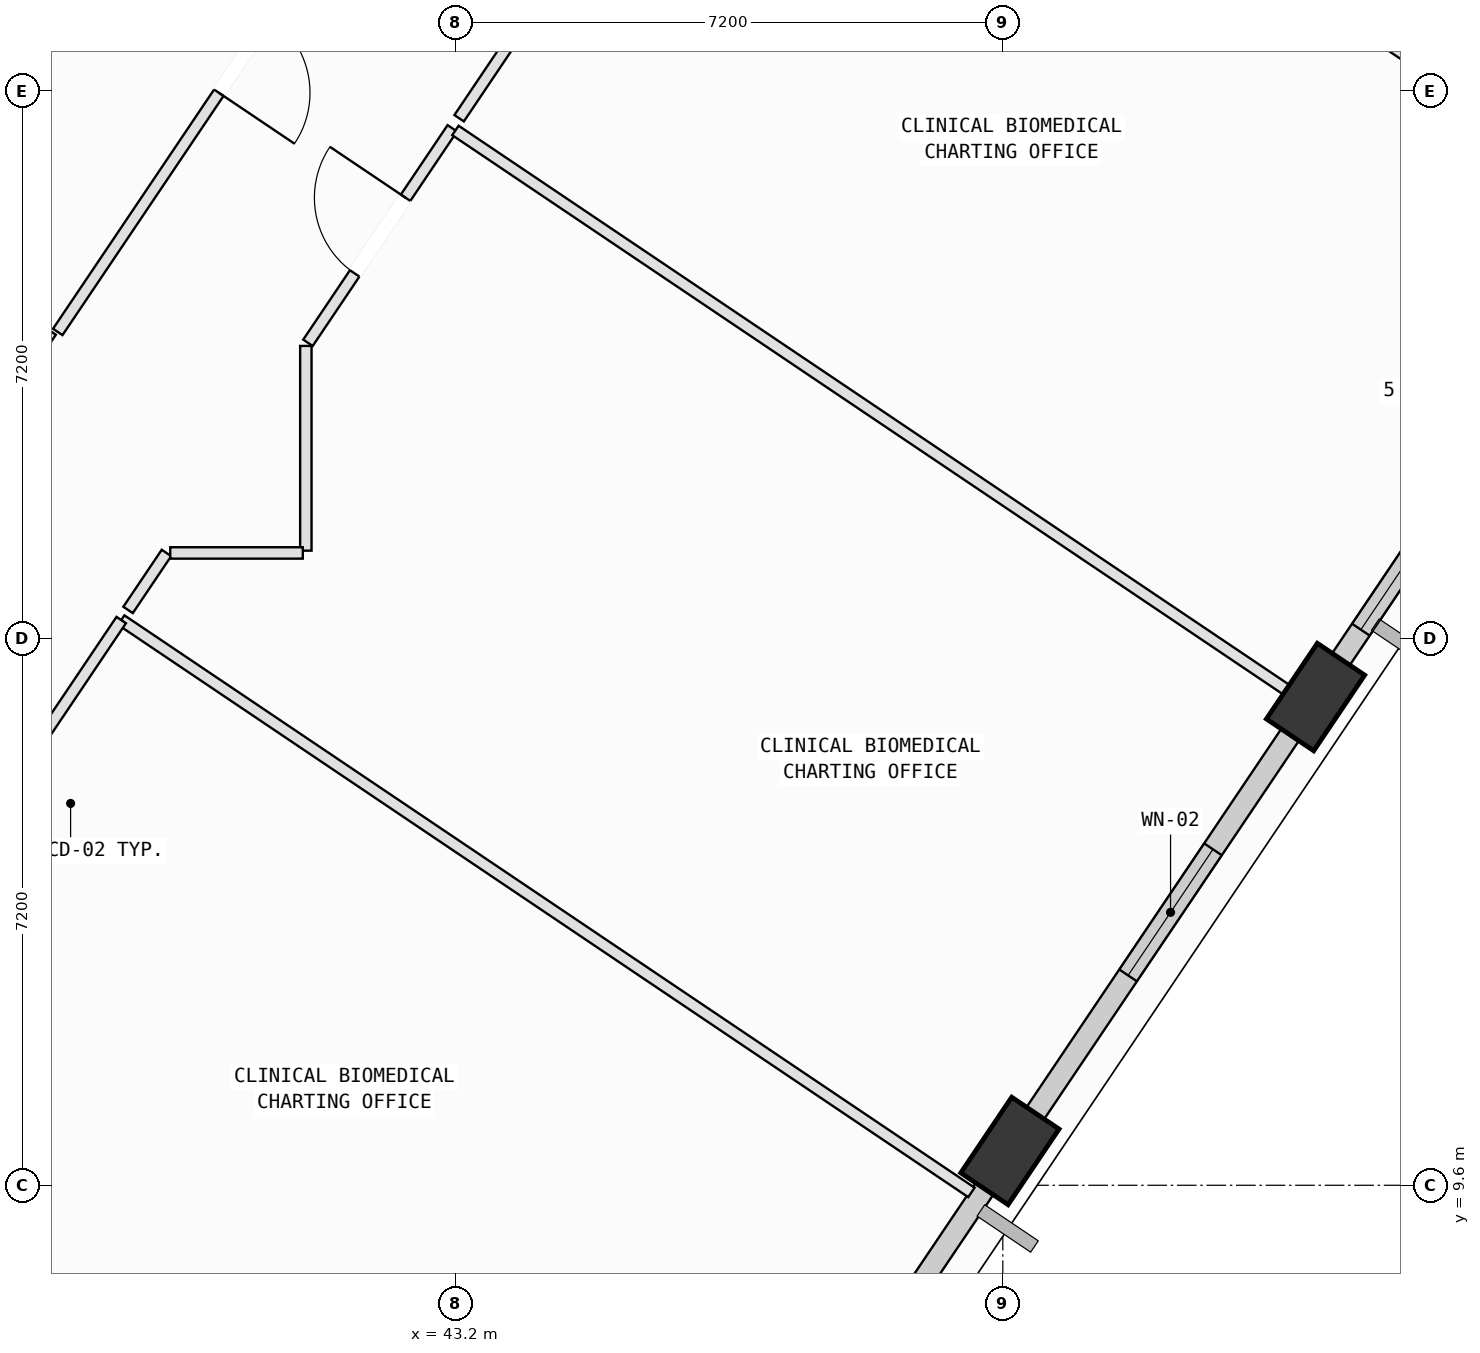
"""IFC4 building model, lengths in metres.
Left out: names, types, materials, properties, quantities, classifications, styles, units other than length and angle.
Written with IfcOpenShell. Run it as: python <this file> out.ifc"""

import sys

from ifc_helpers import new_model, si_unit, direction, frame, frame_2d, origin, origin_2d, place, context, subcontext, project, spatial, rectangle, extrude, element, fill, save


model = new_model("IFC4")
c1 = context("Model", 3, precision=1e-05, world=origin(), true_north=direction((0.0, 1.0)))
c2 = subcontext(c1, "Body", "Model", "MODEL_VIEW")
j1 = project(units=[si_unit("LENGTHUNIT", "METRE"), si_unit("PLANEANGLEUNIT", "RADIAN")], contexts=[c1])
p1 = place(None, origin())
s1 = spatial("IfcSite", under=j1, at=p1, CompositionType="ELEMENT")
p2 = place(p1, origin())
s2 = spatial("IfcBuilding", under=s1, at=p2, CompositionType="ELEMENT")
p3 = place(p2, frame((0.0, 0.0, 263.2)))
s3 = spatial("IfcBuildingStorey", under=s2, at=p3, CompositionType="ELEMENT", Elevation=263.2)
p4 = place(p3, frame((50.493, 10.052, 0.002), z_axis=(0.060244957035, 0.070203312356, 0.995711825824), x_axis=(-0.961707168272, -0.263116868438, 0.076738751868)))
e1 = element("IfcColumn", 1, at=p4, inside=s3, PredefinedType="COLUMN", context=c2, shape_type="SweptSolid", body=[
    extrude(rectangle(XDim=1.2, YDim=0.75, at=origin_2d()), origin(), (0.0, 0.0, 1.0), 3.947),
])
p5 = place(p3, frame((54.514, 16.024, 0.002), z_axis=(0.035506690498, 0.086601684142, 0.9956100759), x_axis=(-0.830026397093, -0.552293328745, 0.077641864689)))
e2 = element("IfcColumn", 2, at=p5, inside=s3, PredefinedType="COLUMN", context=c2, shape_type="SweptSolid", body=[
    extrude(rectangle(XDim=1.2, YDim=0.75, at=origin_2d()), origin(), (0.0, 0.0, 1.0), 3.947),
])
p6 = place(p3, frame((50.375, 9.875, 0.0), z_axis=(0.0, 0.0, 1.0), x_axis=(-0.558480653556, -0.829517546291, 0.0)))
e3 = element("IfcWall", 3, at=p6, inside=s3, PredefinedType="SOLIDWALL", context=c2, shape_type="SweptSolid", body=[
    extrude(rectangle(XDim=6.413, YDim=0.28, at=frame_2d((3.207, 0.0))), origin(), (0.0, 0.0, 1.0), 3.185),
])
p7 = place(p6, frame((2.771, 0.0, 0.75)))
e4 = element("IfcOpeningElement", 4, at=p7, cuts=e3, PredefinedType="OPENING", context=c2, shape_type="SweptSolid", body=[
    extrude(rectangle(XDim=1.6, YDim=1.95, at=frame_2d((0.8, 0.975))), frame((0.0, 0.15, 0.0), z_axis=(0.0, -1.0, 0.0), x_axis=(1.0, 0.0, 0.0)), (0.0, 0.0, 1.0), 0.3),
])
p8 = place(p3, frame((54.396, 15.848, 0.0), z_axis=(0.0, 0.0, 1.0), x_axis=(-0.558449495044, -0.829538523208, 0.0)))
e5 = element("IfcWall", 5, at=p8, inside=s3, PredefinedType="SOLIDWALL", context=c2, shape_type="SweptSolid", body=[
    extrude(rectangle(XDim=6.407, YDim=0.28, at=frame_2d((3.203, 0.0))), origin(), (0.0, 0.0, 1.0), 3.185),
])
p9 = place(p8, frame((2.204, 0.0, 0.75)))
e6 = element("IfcOpeningElement", 6, at=p9, cuts=e5, PredefinedType="OPENING", context=c2, shape_type="SweptSolid", body=[
    extrude(rectangle(XDim=2.0, YDim=1.95, at=frame_2d((1.0, 0.975))), frame((0.0, 0.15, 0.0), z_axis=(0.0, -1.0, 0.0), x_axis=(1.0, 0.0, 0.0)), (0.0, 0.0, 1.0), 0.3),
])
p10 = place(p3, frame((58.423, 21.829, 0.0), z_axis=(0.0, 0.0, 1.0), x_axis=(-0.558495168745, -0.829507773615, 0.0)))
e7 = element("IfcWall", 7, at=p10, inside=s3, PredefinedType="SOLIDWALL", context=c2, shape_type="SweptSolid", body=[
    extrude(rectangle(XDim=6.418, YDim=0.28, at=frame_2d((3.209, 0.0))), origin(), (0.0, 0.0, 1.0), 3.185),
])
p11 = place(p10, frame((2.512, 0.0, 0.75)))
e8 = element("IfcOpeningElement", 8, at=p11, cuts=e7, PredefinedType="OPENING", context=c2, shape_type="SweptSolid", body=[
    extrude(rectangle(XDim=1.4, YDim=1.85, at=frame_2d((0.7, 0.925))), frame((0.0, 0.15, 0.0), z_axis=(0.0, -1.0, 0.0), x_axis=(1.0, 0.0, 0.0)), (0.0, 0.0, 1.0), 0.3),
])
p12 = place(p10, frame((4.53, 0.0, 0.75)))
e9 = element("IfcOpeningElement", 9, at=p12, cuts=e7, PredefinedType="OPENING", context=c2, shape_type="SweptSolid", body=[
    extrude(rectangle(XDim=1.4, YDim=1.85, at=frame_2d((0.7, 0.925))), frame((0.0, 0.15, 0.0), z_axis=(0.0, -1.0, 0.0), x_axis=(1.0, 0.0, 0.0)), (0.0, 0.0, 1.0), 0.3),
])
p13 = place(p3, frame((36.15, 9.419, 0.0), z_axis=(0.0, 0.0, 1.0), x_axis=(0.829512010083, -0.558488876458, 0.0)))
e10 = element("IfcWall", 10, at=p13, inside=s3, PredefinedType="PARTITIONING", context=c2, shape_type="SweptSolid", body=[
    extrude(rectangle(XDim=11.774, YDim=0.15, at=frame_2d((5.887, 0.0))), origin(), (0.0, 0.0, 1.0), 3.085),
])
p14 = place(p13, frame((5.457, 0.0, 0.0)))
e11 = element("IfcOpeningElement", 11, at=p14, cuts=e10, PredefinedType="OPENING", context=c2, shape_type="SweptSolid", body=[
    extrude(rectangle(XDim=0.86, YDim=2.06, at=frame_2d((0.43, 1.03))), frame((0.0, 0.085, 0.0), z_axis=(0.0, -1.0, 0.0), x_axis=(1.0, 0.0, 0.0)), (0.0, 0.0, 1.0), 0.17),
])
p15 = place(p3, frame((38.801, 17.037, 0.0), z_axis=(0.0, 0.0, 1.0), x_axis=(0.829520972269, -0.558475564878, 0.0)))
e12 = element("IfcWall", 12, at=p15, inside=s3, PredefinedType="PARTITIONING", context=c2, shape_type="SweptSolid", body=[
    extrude(rectangle(XDim=13.485, YDim=0.15, at=frame_2d((6.742, 0.0))), origin(), (0.0, 0.0, 1.0), 3.7),
])
p16 = place(p3, frame((36.15, 13.099, 0.0), z_axis=(0.0, 0.0, 1.0), x_axis=(0.558456682141, 0.829533684772, 0.0)))
e13 = element("IfcWall", 13, at=p16, inside=s3, PredefinedType="PARTITIONING", context=c2, shape_type="SweptSolid", body=[
    extrude(rectangle(XDim=4.747, YDim=0.15, at=frame_2d((2.374, 0.0))), origin(), (0.0, 0.0, 1.0), 3.7),
])
p17 = place(p16, frame((1.774, 0.0, 0.0)))
e14 = element("IfcOpeningElement", 14, at=p17, cuts=e13, PredefinedType="OPENING", context=c2, shape_type="SweptSolid", body=[
    extrude(rectangle(XDim=1.2, YDim=2.15, at=frame_2d((0.6, 1.075))), frame((0.0, 0.085, 0.0), z_axis=(0.0, -1.0, 0.0), x_axis=(1.0, 0.0, 0.0)), (0.0, 0.0, 1.0), 0.17),
])
p18 = place(p3, frame((41.23, 17.95, 0.0), z_axis=(0.0, 0.0, 1.0), x_axis=(0.0, 1.0, 0.0)))
e15 = element("IfcWall", 15, at=p18, inside=s3, PredefinedType="PARTITIONING", context=c2, shape_type="SweptSolid", body=[
    extrude(rectangle(XDim=2.694, YDim=0.15, at=frame_2d((1.347, 0.0))), origin(), (0.0, 0.0, 1.0), 3.7),
])
p19 = place(p3, frame((41.258, 20.685, 0.0), z_axis=(0.0, 0.0, 1.0), x_axis=(0.558272819902, 0.829657434462, 0.0)))
e16 = element("IfcWall", 16, at=p19, inside=s3, PredefinedType="PARTITIONING", context=c2, shape_type="SweptSolid", body=[
    extrude(rectangle(XDim=3.401, YDim=0.15, at=frame_2d((1.701, 0.0))), origin(), (0.0, 0.0, 1.0), 3.7),
])
p20 = place(p19, frame((1.101, 0.0, 0.0)))
e17 = element("IfcOpeningElement", 17, at=p20, cuts=e16, PredefinedType="OPENING", context=c2, shape_type="SweptSolid", body=[
    extrude(rectangle(XDim=1.2, YDim=2.15, at=frame_2d((0.6, 1.075))), frame((0.0, 0.085, 0.0), z_axis=(0.0, -1.0, 0.0), x_axis=(1.0, 0.0, 0.0)), (0.0, 0.0, 1.0), 0.17),
])
p21 = place(p3, frame((43.198, 23.479, 0.0), z_axis=(0.0, 0.0, 1.0), x_axis=(0.829581933243, -0.558385006994, 0.0)))
e18 = element("IfcWall", 18, at=p21, inside=s3, PredefinedType="PARTITIONING", context=c2, shape_type="SweptSolid", body=[
    extrude(rectangle(XDim=13.466, YDim=0.15, at=frame_2d((6.733, 0.0))), origin(), (0.0, 0.0, 1.0), 3.7),
])
p22 = place(p3, frame((51.009, 10.405, 0.0), z_axis=(0.0, 0.0, 1.0), x_axis=(-0.558600379479, -0.829436927105, 0.0)))
e19 = element("IfcWall", 19, at=p22, inside=s3, PredefinedType="PARTITIONING", context=c2, shape_type="SweptSolid", body=[
    extrude(rectangle(XDim=0.793, YDim=0.15, at=frame_2d((0.396, 0.0))), origin(), (0.0, 0.0, 1.0), 3.185),
])
p23 = place(p3, frame((38.891, 17.17, 0.0), z_axis=(0.0, 0.0, 1.0), x_axis=(0.558433549648, 0.829549257505, 0.0)))
e20 = element("IfcWall", 20, at=p23, inside=s3, PredefinedType="PARTITIONING", context=c2, shape_type="SweptSolid", body=[
    extrude(rectangle(XDim=0.904, YDim=0.15, at=frame_2d((0.452, 0.0))), origin(), (0.0, 0.0, 1.0), 3.7),
])
p24 = place(p3, frame((39.446, 17.92, 0.0), z_axis=(0.0, 0.0, 1.0), x_axis=(1.0, 0.0, 0.0)))
e21 = element("IfcWall", 21, at=p24, inside=s3, PredefinedType="PARTITIONING", context=c2, shape_type="SweptSolid", body=[
    extrude(rectangle(XDim=1.744, YDim=0.15, at=frame_2d((0.872, 0.0))), origin(), (0.0, 0.0, 1.0), 3.7),
])
p25 = place(p3, frame((43.247, 23.64, 0.0), z_axis=(0.0, 0.0, 1.0), x_axis=(0.558419088265, 0.829558992394, 0.0)))
e22 = element("IfcWall", 22, at=p25, inside=s3, PredefinedType="PARTITIONING", context=c2, shape_type="SweptSolid", body=[
    extrude(rectangle(XDim=7.639, YDim=0.15, at=frame_2d((3.82, 0.0))), origin(), (0.0, 0.0, 1.0), 3.7),
])
p26 = place(p25, frame((3.219, 0.0, 0.0)))
e23 = element("IfcOpeningElement", 23, at=p26, cuts=e22, PredefinedType="OPENING", context=c2, shape_type="SweptSolid", body=[
    extrude(rectangle(XDim=1.2, YDim=2.15, at=frame_2d((0.6, 1.075))), frame((0.0, 0.085, 0.0), z_axis=(0.0, -1.0, 0.0), x_axis=(1.0, 0.0, 0.0)), (0.0, 0.0, 1.0), 0.17),
])
p27 = place(p3, frame((47.513, 29.977, 0.0), z_axis=(0.0, 0.0, 1.0), x_axis=(0.829559460975, -0.558418392164, 0.0)))
e24 = element("IfcWall", 24, at=p27, inside=s3, PredefinedType="PARTITIONING", context=c2, shape_type="SweptSolid", body=[
    extrude(rectangle(XDim=13.148, YDim=0.15, at=frame_2d((6.574, 0.0))), origin(), (0.0, 0.0, 1.0), 3.7),
])
p28 = place(p3, frame((55.029, 16.376, 0.0), z_axis=(0.0, 0.0, 1.0), x_axis=(-0.558958732834, -0.829195474535, 0.0)))
e25 = element("IfcWall", 25, at=p28, inside=s3, PredefinedType="PARTITIONING", context=c2, shape_type="SweptSolid", body=[
    extrude(rectangle(XDim=0.555, YDim=0.15, at=frame_2d((0.277, 0.0))), origin(), (0.0, 0.0, 1.0), 3.185),
])
p29 = place(p3, frame((34.27, 23.173, 0.0), z_axis=(0.0, 0.0, 1.0), x_axis=(0.82942268085, -0.558621532427, 0.0)))
e26 = element("IfcWall", 26, at=p29, inside=s3, PredefinedType="PARTITIONING", context=c2, shape_type="SweptSolid", body=[
    extrude(rectangle(XDim=4.375, YDim=0.15, at=frame_2d((2.188, 0.0))), origin(), (0.0, 0.0, 1.0), 3.7),
])
p30 = place(p3, frame((42.874, 28.118, 0.0), z_axis=(0.0, 0.0, 1.0), x_axis=(-0.558470489053, -0.829524389549, 0.0)))
e27 = element("IfcWall", 27, at=p30, inside=s3, PredefinedType="PARTITIONING", context=c2, shape_type="SweptSolid", body=[
    extrude(rectangle(XDim=8.788, YDim=0.15, at=frame_2d((4.394, 0.0))), origin(), (0.0, 0.0, 1.0), 3.7),
])
p31 = place(p30, frame((3.794, 0.0, 0.0)))
e28 = element("IfcOpeningElement", 28, at=p31, cuts=e27, PredefinedType="OPENING", context=c2, shape_type="SweptSolid", body=[
    extrude(rectangle(XDim=1.2, YDim=2.15, at=frame_2d((0.6, 1.075))), frame((0.0, 0.085, 0.0), z_axis=(0.0, -1.0, 0.0), x_axis=(1.0, 0.0, 0.0)), (0.0, 0.0, 1.0), 0.17),
])
p32 = place(p3, frame((33.786, 23.643, 0.0), z_axis=(0.0, 0.0, 1.0), x_axis=(0.558413136962, 0.829562998492, 0.0)))
e29 = element("IfcWall", 29, at=p32, inside=s3, PredefinedType="PARTITIONING", context=c2, shape_type="SweptSolid", body=[
    extrude(rectangle(XDim=8.788, YDim=0.15, at=frame_2d((4.394, 0.0))), origin(), (0.0, 0.0, 1.0), 3.185),
])
p33 = place(p9, origin())
e30 = element("IfcWindow", 30, at=p33, inside=s3, PartitioningType="SINGLE_PANEL", PredefinedType="WINDOW", context=c2, shape_type="SweptSolid", body=[
    extrude(rectangle(XDim=2.0, YDim=1.95, at=frame_2d((1.0, 0.975))), frame((0.0, 0.03, 0.0), z_axis=(0.0, -1.0, 0.0), x_axis=(1.0, 0.0, 0.0)), (0.0, 0.0, 1.0), 0.06),
])
fill(e6, e30)
p34 = place(p12, origin())
e31 = element("IfcWindow", 31, at=p34, inside=s3, PartitioningType="SINGLE_PANEL", PredefinedType="WINDOW", context=c2, shape_type="SweptSolid", body=[
    extrude(rectangle(XDim=1.4, YDim=1.85, at=frame_2d((0.7, 0.925))), frame((0.0, 0.03, 0.0), z_axis=(0.0, -1.0, 0.0), x_axis=(1.0, 0.0, 0.0)), (0.0, 0.0, 1.0), 0.06),
])
fill(e9, e31)
p35 = place(p20, origin())
e32 = element("IfcDoor", 32, at=p35, inside=s3, OperationType="SINGLE_SWING_RIGHT", PredefinedType="DOOR", context=c2, shape_type="SweptSolid", body=[
    extrude(rectangle(XDim=1.2, YDim=2.15, at=frame_2d((0.6, 1.075))), frame((0.0, 0.025, 0.0), z_axis=(0.0, -1.0, 0.0), x_axis=(1.0, 0.0, 0.0)), (0.0, 0.0, 1.0), 0.05),
])
fill(e17, e32)
p36 = place(p31, origin())
e33 = element("IfcDoor", 33, at=p36, inside=s3, OperationType="SINGLE_SWING_RIGHT", PredefinedType="DOOR", context=c2, shape_type="SweptSolid", body=[
    extrude(rectangle(XDim=1.2, YDim=2.15, at=frame_2d((0.6, 1.075))), frame((0.0, 0.025, 0.0), z_axis=(0.0, -1.0, 0.0), x_axis=(1.0, 0.0, 0.0)), (0.0, 0.0, 1.0), 0.05),
])
fill(e28, e33)
save(model, sys.argv[1])
